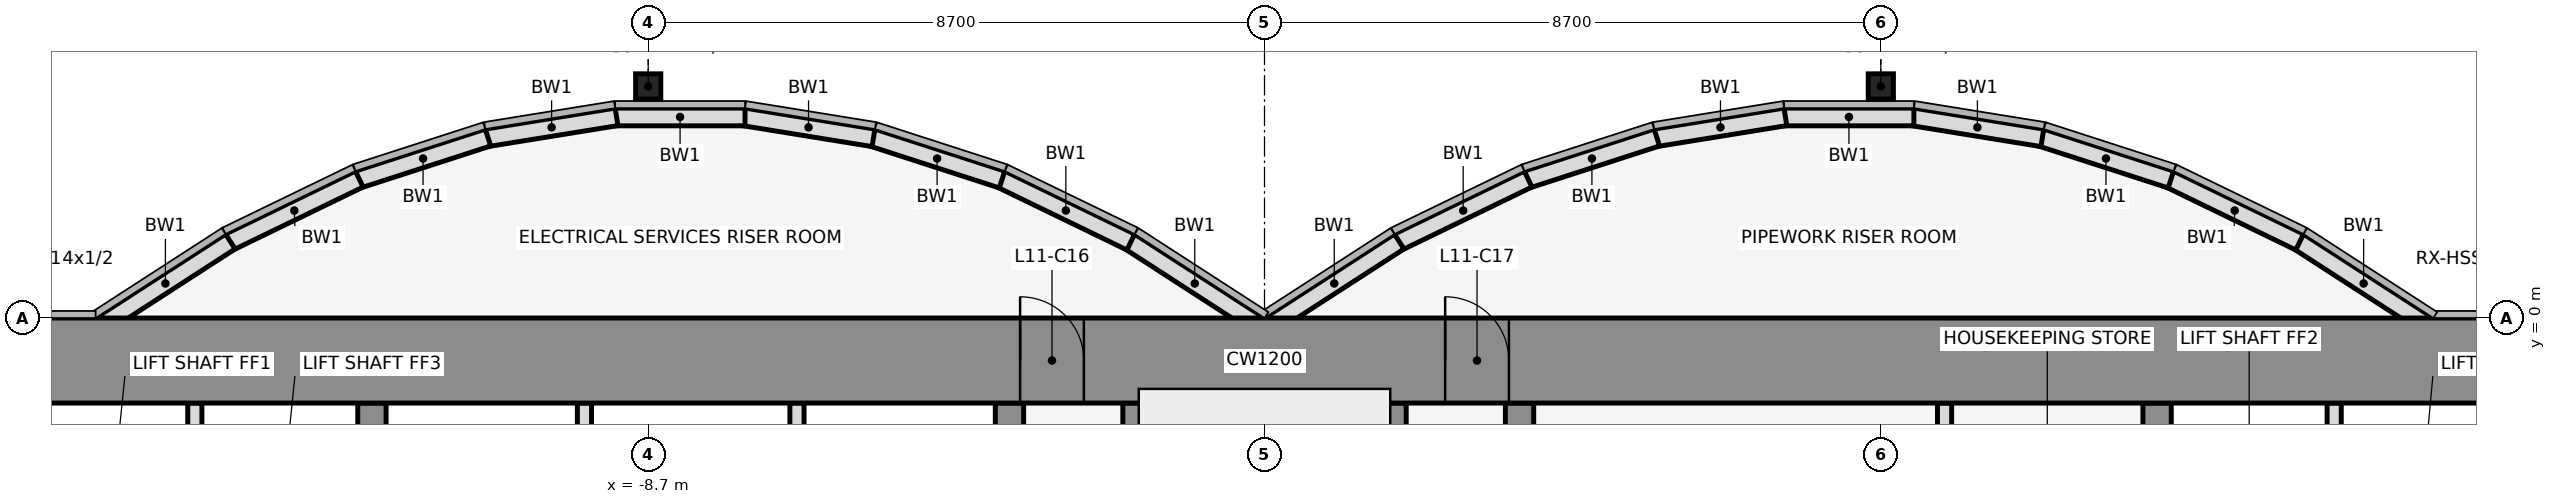
"""IFC4 building model, lengths in metres.
Left out: names, types, materials, properties, quantities, classifications, styles, units other than length and angle.
Written with IfcOpenShell. Run it as: python <this file> out.ifc"""

import sys

from ifc_helpers import new_model, si_unit, direction, frame, frame_2d, origin, origin_2d, place, context, subcontext, project, spatial, rectangle, hollow_rectangle, extrude, element, fill, save


model = new_model("IFC4")
c1 = context("Model", 3, precision=1e-05, world=origin(), true_north=direction((0.0, 1.0)))
c2 = subcontext(c1, "Body", "Model", "MODEL_VIEW")
j1 = project(units=[si_unit("LENGTHUNIT", "METRE"), si_unit("PLANEANGLEUNIT", "RADIAN")], contexts=[c1])
p1 = place(None, origin())
s1 = spatial("IfcSite", under=j1, at=p1, CompositionType="ELEMENT")
p2 = place(p1, origin())
s2 = spatial("IfcBuilding", under=s1, at=p2, CompositionType="ELEMENT")
p3 = place(p2, frame((0.0, 0.0, 57.5)))
s3 = spatial("IfcBuildingStorey", under=s2, at=p3, CompositionType="ELEMENT", Elevation=57.5)
for number, where, z_axis, x_axis in (
    (1, (-8.7, 3.269, 0.0), (0.0, 0.0, 1.0), (1.0, 0.0, 0.0)),
    (2, (8.7, 3.269, 0.0), (0.0, 0.0, 1.0), (1.0, 0.0, 0.0)),
):
    element("IfcColumn", number, at=place(p3, frame(where, z_axis=z_axis, x_axis=x_axis)), inside=s3, PredefinedType="COLUMN", context=c2, shape_type="SweptSolid", body=[
        extrude(hollow_rectangle(XDim=0.356, YDim=0.356, WallThickness=0.012, at=origin_2d()), origin(), (0.0, 0.0, 1.0), 4.5),
    ])
p4 = place(p3, frame((16.432, -0.105, 0.0), z_axis=(0.0, 0.0, 1.0), x_axis=(-0.83981312244, 0.542875602121, 0.0)))
e3 = element("IfcWall", 3, at=p4, inside=s3, PredefinedType="STANDARD", context=c2, shape_type="SweptSolid", body=[
    extrude(rectangle(XDim=2.183, YDim=0.25, at=frame_2d((1.091, 0.0))), origin(), (0.0, 0.0, 1.0), 4.35),
])
p5 = place(p3, frame((14.612, 1.073, 0.0), z_axis=(0.0, 0.0, 1.0), x_axis=(-0.89982408427, 0.436252928206, 0.0)))
e4 = element("IfcWall", 4, at=p5, inside=s3, PredefinedType="STANDARD", context=c2, shape_type="SweptSolid", body=[
    extrude(rectangle(XDim=2.038, YDim=0.25, at=frame_2d((1.019, 0.0))), origin(), (0.0, 0.0, 1.0), 4.35),
])
p6 = place(p3, frame((12.795, 1.955, 0.0), z_axis=(0.0, 0.0, 1.0), x_axis=(-0.951495806175, 0.307661714928, 0.0)))
e5 = element("IfcWall", 5, at=p6, inside=s3, PredefinedType="STANDARD", context=c2, shape_type="SweptSolid", body=[
    extrude(rectangle(XDim=1.927, YDim=0.25, at=frame_2d((0.963, 0.0))), origin(), (0.0, 0.0, 1.0), 4.35),
])
p7 = place(p3, frame((10.98, 2.543, 0.0), z_axis=(0.0, 0.0, 1.0), x_axis=(-0.987181718931, 0.159600293885, 0.0)))
e6 = element("IfcWall", 6, at=p7, inside=s3, PredefinedType="STANDARD", context=c2, shape_type="SweptSolid", body=[
    extrude(rectangle(XDim=1.857, YDim=0.25, at=frame_2d((0.929, 0.0))), origin(), (0.0, 0.0, 1.0), 4.35),
])
p8 = place(p3, frame((9.167, 2.838, 0.0), z_axis=(0.0, 0.0, 1.0), x_axis=(-1.0, 0.0, 0.0)))
e7 = element("IfcWall", 7, at=p8, inside=s3, PredefinedType="STANDARD", context=c2, shape_type="SweptSolid", body=[
    extrude(rectangle(XDim=1.833, YDim=0.25, at=frame_2d((0.917, 0.0))), origin(), (0.0, 0.0, 1.0), 4.35),
])
p9 = place(p3, frame((7.353, 2.84, 0.0), z_axis=(0.0, 0.0, 1.0), x_axis=(-0.987181718931, -0.159600293885, 0.0)))
e8 = element("IfcWall", 8, at=p9, inside=s3, PredefinedType="STANDARD", context=c2, shape_type="SweptSolid", body=[
    extrude(rectangle(XDim=1.857, YDim=0.25, at=frame_2d((0.929, 0.0))), origin(), (0.0, 0.0, 1.0), 4.35),
])
p10 = place(p3, frame((5.538, 2.548, 0.0), z_axis=(0.0, 0.0, 1.0), x_axis=(-0.951495806175, -0.307661714928, 0.0)))
e9 = element("IfcWall", 9, at=p10, inside=s3, PredefinedType="STANDARD", context=c2, shape_type="SweptSolid", body=[
    extrude(rectangle(XDim=1.927, YDim=0.25, at=frame_2d((0.963, 0.0))), origin(), (0.0, 0.0, 1.0), 4.35),
])
p11 = place(p3, frame((3.721, 1.962, 0.0), z_axis=(0.0, 0.0, 1.0), x_axis=(-0.89982408427, -0.436252928206, 0.0)))
e10 = element("IfcWall", 10, at=p11, inside=s3, PredefinedType="STANDARD", context=c2, shape_type="SweptSolid", body=[
    extrude(rectangle(XDim=2.038, YDim=0.25, at=frame_2d((1.019, 0.0))), origin(), (0.0, 0.0, 1.0), 4.35),
])
for number, where, z_axis, x_axis in (
    (11, (1.901, 1.08, 0.0), (0.0, 0.0, 1.0), (-0.84, -0.543, 0.0)),
    (12, (-0.068, -0.105, 0.0), (0.0, 0.0, 1.0), (-0.84, 0.543, 0.0)),
):
    element("IfcWall", number, at=place(p3, frame(where, z_axis=z_axis, x_axis=x_axis)), inside=s3, PredefinedType="STANDARD", context=c2, shape_type="SweptSolid", body=[
        extrude(rectangle(XDim=2.183, YDim=0.25, at=frame_2d((1.091, 0.0))), origin(), (0.0, 0.0, 1.0), 4.35),
    ])
p12 = place(p3, frame((-1.888, 1.073, 0.0), z_axis=(0.0, 0.0, 1.0), x_axis=(-0.89982408427, 0.436252928206, 0.0)))
e13 = element("IfcWall", 13, at=p12, inside=s3, PredefinedType="STANDARD", context=c2, shape_type="SweptSolid", body=[
    extrude(rectangle(XDim=2.038, YDim=0.25, at=frame_2d((1.019, 0.0))), origin(), (0.0, 0.0, 1.0), 4.35),
])
p13 = place(p3, frame((-3.705, 1.955, 0.0), z_axis=(0.0, 0.0, 1.0), x_axis=(-0.951495806175, 0.307661714928, 0.0)))
e14 = element("IfcWall", 14, at=p13, inside=s3, PredefinedType="STANDARD", context=c2, shape_type="SweptSolid", body=[
    extrude(rectangle(XDim=1.927, YDim=0.25, at=frame_2d((0.963, 0.0))), origin(), (0.0, 0.0, 1.0), 4.35),
])
p14 = place(p3, frame((-5.52, 2.543, 0.0), z_axis=(0.0, 0.0, 1.0), x_axis=(-0.987181718931, 0.159600293885, 0.0)))
e15 = element("IfcWall", 15, at=p14, inside=s3, PredefinedType="STANDARD", context=c2, shape_type="SweptSolid", body=[
    extrude(rectangle(XDim=1.857, YDim=0.25, at=frame_2d((0.929, 0.0))), origin(), (0.0, 0.0, 1.0), 4.35),
])
p15 = place(p3, frame((-7.333, 2.838, 0.0), z_axis=(0.0, 0.0, 1.0), x_axis=(-1.0, 0.0, 0.0)))
e16 = element("IfcWall", 16, at=p15, inside=s3, PredefinedType="STANDARD", context=c2, shape_type="SweptSolid", body=[
    extrude(rectangle(XDim=1.833, YDim=0.25, at=frame_2d((0.917, 0.0))), origin(), (0.0, 0.0, 1.0), 4.35),
])
p16 = place(p3, frame((-9.147, 2.84, 0.0), z_axis=(0.0, 0.0, 1.0), x_axis=(-0.987181718931, -0.159600293885, 0.0)))
e17 = element("IfcWall", 17, at=p16, inside=s3, PredefinedType="STANDARD", context=c2, shape_type="SweptSolid", body=[
    extrude(rectangle(XDim=1.857, YDim=0.25, at=frame_2d((0.929, 0.0))), origin(), (0.0, 0.0, 1.0), 4.35),
])
p17 = place(p3, frame((-10.962, 2.548, 0.0), z_axis=(0.0, 0.0, 1.0), x_axis=(-0.951495806175, -0.307661714928, 0.0)))
e18 = element("IfcWall", 18, at=p17, inside=s3, PredefinedType="STANDARD", context=c2, shape_type="SweptSolid", body=[
    extrude(rectangle(XDim=1.927, YDim=0.25, at=frame_2d((0.963, 0.0))), origin(), (0.0, 0.0, 1.0), 4.35),
])
p18 = place(p3, frame((-12.779, 1.962, 0.0), z_axis=(0.0, 0.0, 1.0), x_axis=(-0.89982408427, -0.436252928206, 0.0)))
e19 = element("IfcWall", 19, at=p18, inside=s3, PredefinedType="STANDARD", context=c2, shape_type="SweptSolid", body=[
    extrude(rectangle(XDim=2.038, YDim=0.25, at=frame_2d((1.019, 0.0))), origin(), (0.0, 0.0, 1.0), 4.35),
])
p19 = place(p3, frame((-14.599, 1.08, 0.0), z_axis=(0.0, 0.0, 1.0), x_axis=(-0.83981312244, -0.542875602121, 0.0)))
e20 = element("IfcWall", 20, at=p19, inside=s3, PredefinedType="STANDARD", context=c2, shape_type="SweptSolid", body=[
    extrude(rectangle(XDim=2.183, YDim=0.25, at=frame_2d((1.091, 0.0))), origin(), (0.0, 0.0, 1.0), 4.35),
])
p20 = place(p3, frame((-15.1, -4.6, 0.0), z_axis=(0.0, 0.0, 1.0), x_axis=(0.0, 1.0, 0.0)))
e21 = element("IfcWall", 21, at=p20, inside=s3, PredefinedType="PARTITIONING", context=c2, shape_type="SweptSolid", body=[
    extrude(rectangle(XDim=3.4, YDim=0.2, at=frame_2d((1.7, 0.0))), origin(), (0.0, 0.0, 1.0), 3.418),
])
p21 = place(p3, frame((-12.6, -11.8, 0.0), z_axis=(0.0, 0.0, 1.0), x_axis=(0.0, 1.0, 0.0)))
e22 = element("IfcWall", 22, at=p21, inside=s3, PredefinedType="SHEAR", context=c2, shape_type="SweptSolid", body=[
    extrude(rectangle(XDim=10.6, YDim=0.4, at=frame_2d((5.3, 0.0))), origin(), (0.0, 0.0, 1.0), 4.5),
])
p22 = place(p21, frame((4.75, 0.0, 0.0)))
e23 = element("IfcOpeningElement", 23, at=p22, cuts=e22, PredefinedType="OPENING", context=c2, shape_type="SweptSolid", body=[
    extrude(rectangle(XDim=1.1, YDim=2.1, at=frame_2d((0.55, 1.05))), frame((0.0, 0.212, 0.0), z_axis=(0.0, -1.0, 0.0), x_axis=(1.0, 0.0, 0.0)), (0.0, 0.0, 1.0), 0.424),
])
for number, where, z_axis, x_axis in (
    (24, (-9.6, -4.6, 0.0), (0.0, 0.0, 1.0), (0.0, 1.0, 0.0)),
    (25, (-6.6, -4.6, 0.0), (0.0, 0.0, 1.0), (0.0, 1.0, 0.0)),
):
    element("IfcWall", number, at=place(p3, frame(where, z_axis=z_axis, x_axis=x_axis)), inside=s3, PredefinedType="PARTITIONING", context=c2, shape_type="SweptSolid", body=[
        extrude(rectangle(XDim=3.4, YDim=0.2, at=frame_2d((1.7, 0.0))), origin(), (0.0, 0.0, 1.0), 3.418),
    ])
p23 = place(p3, frame((-3.6, -11.8, 0.0), z_axis=(0.0, 0.0, 1.0), x_axis=(0.0, 1.0, 0.0)))
e26 = element("IfcWall", 26, at=p23, inside=s3, PredefinedType="SHEAR", context=c2, shape_type="SweptSolid", body=[
    extrude(rectangle(XDim=10.6, YDim=0.4, at=frame_2d((5.3, 0.0))), origin(), (0.0, 0.0, 1.0), 4.5),
])
p24 = place(p23, frame((4.85, 0.0, 0.0)))
e27 = element("IfcOpeningElement", 27, at=p24, cuts=e26, PredefinedType="OPENING", context=c2, shape_type="SweptSolid", body=[
    extrude(rectangle(XDim=0.9, YDim=2.1, at=frame_2d((0.45, 1.05))), frame((0.0, 0.212, 0.0), z_axis=(0.0, -1.0, 0.0), x_axis=(1.0, 0.0, 0.0)), (0.0, 0.0, 1.0), 0.424),
])
for number, where, z_axis, x_axis in (
    (28, (-1.8, -11.8, 0.0), (0.0, 0.0, 1.0), (0.0, 1.0, 0.0)),
    (29, (1.8, -11.8, 0.0), (0.0, 0.0, 1.0), (0.0, 1.0, 0.0)),
):
    element("IfcWall", number, at=place(p3, frame(where, z_axis=z_axis, x_axis=x_axis)), inside=s3, PredefinedType="SHEAR", context=c2, shape_type="SweptSolid", body=[
        extrude(rectangle(XDim=10.6, YDim=0.4, at=frame_2d((5.3, 0.0))), origin(), (0.0, 0.0, 1.0), 4.5),
    ])
p25 = place(p3, frame((3.6, -11.8, 0.0), z_axis=(0.0, 0.0, 1.0), x_axis=(0.0, 1.0, 0.0)))
e30 = element("IfcWall", 30, at=p25, inside=s3, PredefinedType="SHEAR", context=c2, shape_type="SweptSolid", body=[
    extrude(rectangle(XDim=10.6, YDim=0.4, at=frame_2d((5.3, 0.0))), origin(), (0.0, 0.0, 1.0), 4.5),
])
p26 = place(p25, frame((1.35, 0.0, 0.0)))
e31 = element("IfcOpeningElement", 31, at=p26, cuts=e30, PredefinedType="OPENING", context=c2, shape_type="SweptSolid", body=[
    extrude(rectangle(XDim=0.9, YDim=2.1, at=frame_2d((0.45, 1.05))), frame((0.0, 0.212, 0.0), z_axis=(0.0, -1.0, 0.0), x_axis=(1.0, 0.0, 0.0)), (0.0, 0.0, 1.0), 0.424),
])
p27 = place(p3, frame((9.6, -4.6, 0.0), z_axis=(0.0, 0.0, 1.0), x_axis=(0.0, 1.0, 0.0)))
e32 = element("IfcWall", 32, at=p27, inside=s3, PredefinedType="PARTITIONING", context=c2, shape_type="SweptSolid", body=[
    extrude(rectangle(XDim=3.4, YDim=0.2, at=frame_2d((1.7, 0.0))), origin(), (0.0, 0.0, 1.0), 3.418),
])
p28 = place(p3, frame((12.6, -11.8, 0.0), z_axis=(0.0, 0.0, 1.0), x_axis=(0.0, 1.0, 0.0)))
e33 = element("IfcWall", 33, at=p28, inside=s3, PredefinedType="SHEAR", context=c2, shape_type="SweptSolid", body=[
    extrude(rectangle(XDim=10.6, YDim=0.4, at=frame_2d((5.3, 0.0))), origin(), (0.0, 0.0, 1.0), 4.5),
])
p29 = place(p28, frame((4.75, 0.0, 0.0)))
e34 = element("IfcOpeningElement", 34, at=p29, cuts=e33, PredefinedType="OPENING", context=c2, shape_type="SweptSolid", body=[
    extrude(rectangle(XDim=1.1, YDim=2.1, at=frame_2d((0.55, 1.05))), frame((0.0, 0.212, 0.0), z_axis=(0.0, -1.0, 0.0), x_axis=(1.0, 0.0, 0.0)), (0.0, 0.0, 1.0), 0.424),
])
p30 = place(p3, frame((15.1, -4.6, 0.0), z_axis=(0.0, 0.0, 1.0), x_axis=(0.0, 1.0, 0.0)))
e35 = element("IfcWall", 35, at=p30, inside=s3, PredefinedType="PARTITIONING", context=c2, shape_type="SweptSolid", body=[
    extrude(rectangle(XDim=3.4, YDim=0.2, at=frame_2d((1.7, 0.0))), origin(), (0.0, 0.0, 1.0), 3.418),
])
p31 = place(p3, frame((-22.0, -0.6, 0.0), z_axis=(0.0, 0.0, 1.0), x_axis=(1.0, 0.0, 0.0)))
e36 = element("IfcWall", 36, at=p31, inside=s3, PredefinedType="SHEAR", context=c2, shape_type="SweptSolid", body=[
    extrude(rectangle(XDim=44.0, YDim=1.2, at=frame_2d((22.0, 0.0))), origin(), (0.0, 0.0, 1.0), 4.5),
])
p32 = place(p31, frame((18.55, 0.0, 0.0)))
e37 = element("IfcOpeningElement", 37, at=p32, cuts=e36, PredefinedType="OPENING", context=c2, shape_type="SweptSolid", body=[
    extrude(rectangle(XDim=0.9, YDim=2.1, at=frame_2d((0.45, 1.05))), frame((0.0, 0.612, 0.0), z_axis=(0.0, -1.0, 0.0), x_axis=(1.0, 0.0, 0.0)), (0.0, 0.0, 1.0), 1.224),
])
p33 = place(p31, frame((24.55, 0.0, 0.0)))
e38 = element("IfcOpeningElement", 38, at=p33, cuts=e36, PredefinedType="OPENING", context=c2, shape_type="SweptSolid", body=[
    extrude(rectangle(XDim=0.9, YDim=2.1, at=frame_2d((0.45, 1.05))), frame((0.0, 0.612, 0.0), z_axis=(0.0, -1.0, 0.0), x_axis=(1.0, 0.0, 0.0)), (0.0, 0.0, 1.0), 1.224),
])
p34 = place(p32, origin())
e39 = element("IfcDoor", 39, at=p34, inside=s3, OperationType="SINGLE_SWING_LEFT", PredefinedType="DOOR", context=c2, shape_type="SweptSolid", body=[
    extrude(rectangle(XDim=0.9, YDim=2.1, at=frame_2d((0.45, 1.05))), frame((0.0, 0.025, 0.0), z_axis=(0.0, -1.0, 0.0), x_axis=(1.0, 0.0, 0.0)), (0.0, 0.0, 1.0), 0.05),
])
fill(e37, e39)
p35 = place(p33, origin())
e40 = element("IfcDoor", 40, at=p35, inside=s3, OperationType="SINGLE_SWING_LEFT", PredefinedType="DOOR", context=c2, shape_type="SweptSolid", body=[
    extrude(rectangle(XDim=0.9, YDim=2.1, at=frame_2d((0.45, 1.05))), frame((0.0, 0.025, 0.0), z_axis=(0.0, -1.0, 0.0), x_axis=(1.0, 0.0, 0.0)), (0.0, 0.0, 1.0), 0.05),
])
fill(e38, e40)
save(model, sys.argv[1])
